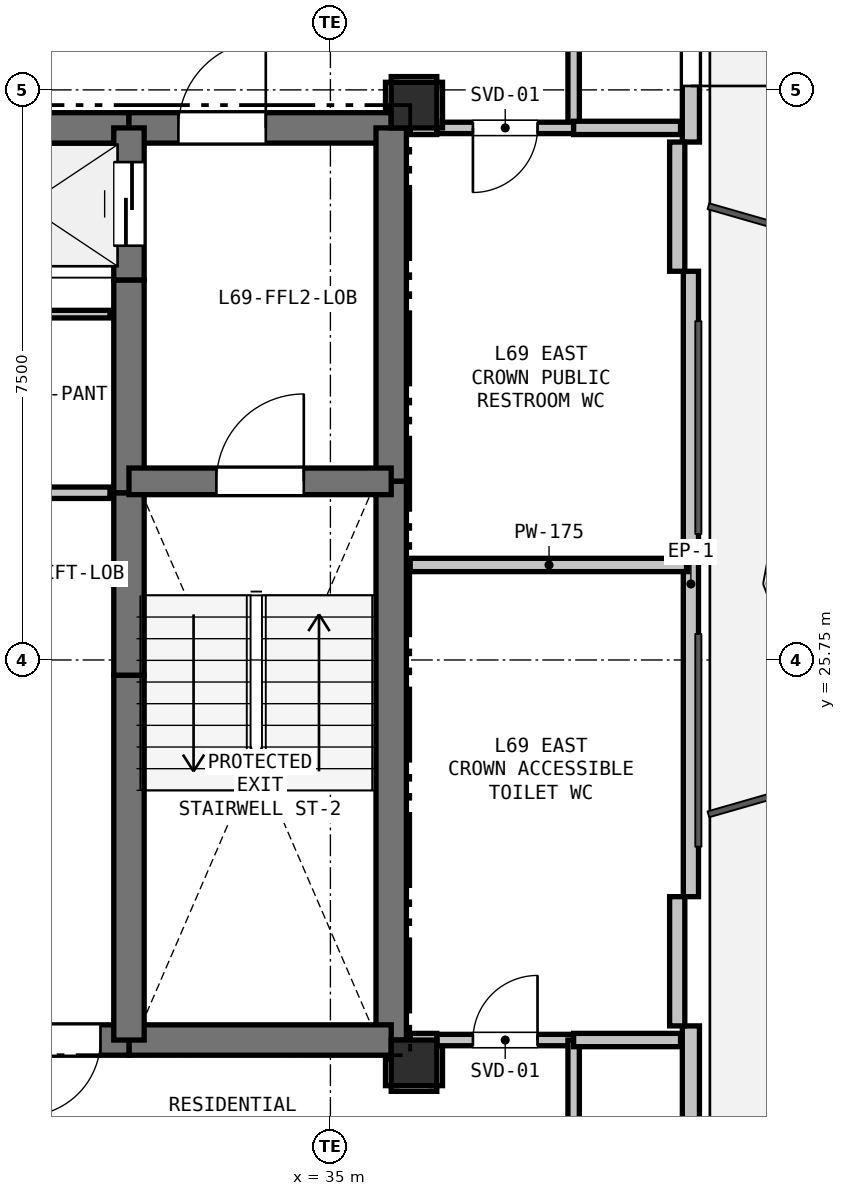
"""IFC4 building model, lengths in metres.
Left out: names, types, materials, properties, quantities, classifications, styles, units other than length and angle.
Written with IfcOpenShell. Run it as: python <this file> out.ifc"""

import sys

from ifc_helpers import new_model, si_unit, direction, frame, frame_2d, origin, origin_2d, place, context, subcontext, project, spatial, rectangle, extrude, element, fill, save


model = new_model("IFC4")
c1 = context("Model", 3, precision=1e-05, world=origin(), true_north=direction((0.0, 1.0)))
c2 = subcontext(c1, "Body", "Model", "MODEL_VIEW")
j1 = project(units=[si_unit("LENGTHUNIT", "METRE"), si_unit("PLANEANGLEUNIT", "RADIAN")], contexts=[c1])
p1 = place(None, origin())
s1 = spatial("IfcSite", under=j1, at=p1, CompositionType="ELEMENT")
p2 = place(p1, origin())
s2 = spatial("IfcBuilding", under=s1, at=p2, CompositionType="ELEMENT")
p3 = place(p2, frame((0.0, 0.0, 246.3)))
s3 = spatial("IfcBuildingStorey", under=s2, at=p3, CompositionType="ELEMENT", Elevation=246.3)
for number, where, z_axis, x_axis in (
    (1, (36.1, 33.05, 0.0), (0.0, 0.0, 1.0), (1.0, 0.0, 0.0)),
    (2, (36.1, 20.45, 0.0), (0.0, 0.0, 1.0), (1.0, 0.0, 0.0)),
):
    element("IfcColumn", number, at=place(p3, frame(where, z_axis=z_axis, x_axis=x_axis)), inside=s3, PredefinedType="COLUMN", context=c2, shape_type="SweptSolid", body=[
        extrude(rectangle(XDim=0.6, YDim=0.6, at=origin_2d()), origin(), (0.0, 0.0, 1.0), 3.3),
    ])
p4 = place(p3, frame((39.743, 41.492, 0.0), z_axis=(0.0, 0.0, 1.0), x_axis=(0.0, -1.0, 0.0)))
e3 = element("IfcWall", 3, at=p4, inside=s3, PredefinedType="SOLIDWALL", context=c2, shape_type="SweptSolid", body=[
    extrude(rectangle(XDim=8.928, YDim=0.225, at=frame_2d((4.464, 0.0))), origin(), (0.0, 0.0, 1.0), 2.64),
])
p5 = place(p4, frame((7.09, 0.0, 0.0)))
e4 = element("IfcOpeningElement", 4, at=p5, cuts=e3, PredefinedType="OPENING", context=c2, shape_type="SweptSolid", body=[
    extrude(rectangle(XDim=1.1, YDim=2.1, at=frame_2d((0.55, 1.05))), frame((0.0, 0.123, 0.0), z_axis=(0.0, -1.0, 0.0), x_axis=(1.0, 0.0, 0.0)), (0.0, 0.0, 1.0), 0.245),
])
p6 = place(p4, frame((1.406, 0.0, 0.9)))
e5 = element("IfcOpeningElement", 5, at=p6, cuts=e3, PredefinedType="OPENING", context=c2, shape_type="SweptSolid", body=[
    extrude(rectangle(XDim=1.2, YDim=1.4, at=frame_2d((0.6, 0.7))), frame((0.0, 0.123, 0.0), z_axis=(0.0, -1.0, 0.0), x_axis=(1.0, 0.0, 0.0)), (0.0, 0.0, 1.0), 0.245),
])
p7 = place(p3, frame((39.743, 30.864, 0.0), z_axis=(0.0, 0.0, 1.0), x_axis=(0.0, -1.0, 0.0)))
e6 = element("IfcWall", 6, at=p7, inside=s3, PredefinedType="PARAPET", context=c2, shape_type="SweptSolid", body=[
    extrude(rectangle(XDim=8.228, YDim=0.2, at=frame_2d((4.114, 0.0))), origin(), (0.0, 0.0, 1.0), 0.2),
])
p8 = place(p3, frame((39.743, 20.936, 0.0), z_axis=(0.0, 0.0, 1.0), x_axis=(0.0, -1.0, 0.0)))
e7 = element("IfcWall", 7, at=p8, inside=s3, PredefinedType="SOLIDWALL", context=c2, shape_type="SweptSolid", body=[
    extrude(rectangle(XDim=8.928, YDim=0.225, at=frame_2d((4.464, 0.0))), origin(), (0.0, 0.0, 1.0), 2.64),
])
p9 = place(p8, frame((5.56, 0.0, 0.9)))
e8 = element("IfcOpeningElement", 8, at=p9, cuts=e7, PredefinedType="OPENING", context=c2, shape_type="SweptSolid", body=[
    extrude(rectangle(XDim=1.8, YDim=1.5, at=frame_2d((0.9, 0.75))), frame((0.0, 0.123, 0.0), z_axis=(0.0, -1.0, 0.0), x_axis=(1.0, 0.0, 0.0)), (0.0, 0.0, 1.0), 0.245),
])
for number, where, z_axis, x_axis in (
    (9, (39.563, 32.564, 0.0), (0.0, 0.0, 1.0), (0.0, -1.0, 0.0)),
    (10, (39.563, 22.636, 0.0), (0.0, 0.0, 1.0), (0.0, -1.0, 0.0)),
):
    element("IfcWall", number, at=place(p3, frame(where, z_axis=z_axis, x_axis=x_axis)), inside=s3, PredefinedType="PARAPET", context=c2, shape_type="SweptSolid", body=[
        extrude(rectangle(XDim=1.7, YDim=0.2, at=frame_2d((0.85, 0.0))), origin(), (0.0, 0.0, 1.0), 2.64),
    ])
p10 = place(p3, frame((29.65, 32.75, 0.0), z_axis=(0.0, 0.0, 1.0), x_axis=(1.0, 0.0, 0.0)))
e11 = element("IfcWall", 11, at=p10, inside=s3, PredefinedType="SHEAR", context=c2, shape_type="SweptSolid", body=[
    extrude(rectangle(XDim=2.7, YDim=0.4, at=frame_2d((1.35, 0.0))), origin(), (0.0, 0.0, 1.0), 3.02),
])
p11 = place(p3, frame((32.35, 32.75, 0.0), z_axis=(0.0, 0.0, 1.0), x_axis=(1.0, 0.0, 0.0)))
e12 = element("IfcWall", 12, at=p11, inside=s3, PredefinedType="SHEAR", context=c2, shape_type="SweptSolid", body=[
    extrude(rectangle(XDim=3.45, YDim=0.4, at=frame_2d((1.725, 0.0))), origin(), (0.0, 0.0, 1.0), 3.02),
])
p12 = place(p11, frame((0.65, 0.0, 0.0)))
e13 = element("IfcOpeningElement", 13, at=p12, cuts=e12, PredefinedType="OPENING", context=c2, shape_type="SweptSolid", body=[
    extrude(rectangle(XDim=1.15, YDim=2.15, at=frame_2d((0.575, 1.075))), frame((0.0, 0.21, 0.0), z_axis=(0.0, -1.0, 0.0), x_axis=(1.0, 0.0, 0.0)), (0.0, 0.0, 1.0), 0.42),
])
p13 = place(p3, frame((35.8, 32.75, 0.0), z_axis=(0.0, 0.0, 1.0), x_axis=(0.0, -1.0, 0.0)))
e14 = element("IfcWall", 14, at=p13, inside=s3, PredefinedType="SHEAR", context=c2, shape_type="SweptSolid", body=[
    extrude(rectangle(XDim=4.65, YDim=0.4, at=frame_2d((2.325, 0.0))), origin(), (0.0, 0.0, 1.0), 3.02),
])
p14 = place(p3, frame((35.8, 28.1, 0.0), z_axis=(0.0, 0.0, 1.0), x_axis=(0.0, -1.0, 0.0)))
e15 = element("IfcWall", 15, at=p14, inside=s3, PredefinedType="SHEAR", context=c2, shape_type="SweptSolid", body=[
    extrude(rectangle(XDim=7.35, YDim=0.4, at=frame_2d((3.675, 0.0))), origin(), (0.0, 0.0, 1.0), 3.02),
])
p15 = place(p3, frame((35.8, 20.75, 0.0), z_axis=(0.0, 0.0, 1.0), x_axis=(-1.0, 0.0, 0.0)))
e16 = element("IfcWall", 16, at=p15, inside=s3, PredefinedType="SHEAR", context=c2, shape_type="SweptSolid", body=[
    extrude(rectangle(XDim=3.45, YDim=0.4, at=frame_2d((1.725, 0.0))), origin(), (0.0, 0.0, 1.0), 3.02),
])
p16 = place(p3, frame((32.35, 20.75, 0.0), z_axis=(0.0, 0.0, 1.0), x_axis=(-1.0, 0.0, 0.0)))
e17 = element("IfcWall", 17, at=p16, inside=s3, PredefinedType="SHEAR", context=c2, shape_type="SweptSolid", body=[
    extrude(rectangle(XDim=1.75, YDim=0.4, at=frame_2d((0.875, 0.0))), origin(), (0.0, 0.0, 1.0), 3.02),
])
p17 = place(p16, frame((0.375, 0.0, 0.0)))
e18 = element("IfcOpeningElement", 18, at=p17, cuts=e17, PredefinedType="OPENING", context=c2, shape_type="SweptSolid", body=[
    extrude(rectangle(XDim=1.0, YDim=2.15, at=frame_2d((0.5, 1.075))), frame((0.0, 0.21, 0.0), z_axis=(0.0, -1.0, 0.0), x_axis=(1.0, 0.0, 0.0)), (0.0, 0.0, 1.0), 0.42),
])
p18 = place(p3, frame((32.35, 20.75, 0.0), z_axis=(0.0, 0.0, 1.0), x_axis=(0.0, 1.0, 0.0)))
e19 = element("IfcWall", 19, at=p18, inside=s3, PredefinedType="SHEAR", context=c2, shape_type="SweptSolid", body=[
    extrude(rectangle(XDim=4.8, YDim=0.4, at=frame_2d((2.4, 0.0))), origin(), (0.0, 0.0, 1.0), 3.02),
])
p19 = place(p3, frame((32.35, 25.55, 0.0), z_axis=(0.0, 0.0, 1.0), x_axis=(0.0, 1.0, 0.0)))
e20 = element("IfcWall", 20, at=p19, inside=s3, PredefinedType="SHEAR", context=c2, shape_type="SweptSolid", body=[
    extrude(rectangle(XDim=2.4, YDim=0.4, at=frame_2d((1.2, 0.0))), origin(), (0.0, 0.0, 1.0), 3.02),
])
p20 = place(p3, frame((32.35, 27.95, 0.0), z_axis=(0.0, 0.0, 1.0), x_axis=(0.0, 1.0, 0.0)))
e21 = element("IfcWall", 21, at=p20, inside=s3, PredefinedType="SHEAR", context=c2, shape_type="SweptSolid", body=[
    extrude(rectangle(XDim=2.8, YDim=0.4, at=frame_2d((1.4, 0.0))), origin(), (0.0, 0.0, 1.0), 3.02),
])
p21 = place(p3, frame((32.35, 30.75, 0.0), z_axis=(0.0, 0.0, 1.0), x_axis=(0.0, 1.0, 0.0)))
e22 = element("IfcWall", 22, at=p21, inside=s3, PredefinedType="SHEAR", context=c2, shape_type="SweptSolid", body=[
    extrude(rectangle(XDim=2.0, YDim=0.4, at=frame_2d((1.0, 0.0))), origin(), (0.0, 0.0, 1.0), 3.02),
])
p22 = place(p21, frame((0.45, 0.0, 0.0)))
e23 = element("IfcOpeningElement", 23, at=p22, cuts=e22, PredefinedType="OPENING", context=c2, shape_type="SweptSolid", body=[
    extrude(rectangle(XDim=1.1, YDim=2.15, at=frame_2d((0.55, 1.075))), frame((0.0, 0.21, 0.0), z_axis=(0.0, -1.0, 0.0), x_axis=(1.0, 0.0, 0.0)), (0.0, 0.0, 1.0), 0.42),
])
p23 = place(p3, frame((32.35, 28.1, 0.0), z_axis=(0.0, 0.0, 1.0), x_axis=(1.0, 0.0, 0.0)))
e24 = element("IfcWall", 24, at=p23, inside=s3, PredefinedType="SHEAR", context=c2, shape_type="SweptSolid", body=[
    extrude(rectangle(XDim=3.45, YDim=0.35, at=frame_2d((1.725, 0.0))), origin(), (0.0, 0.0, 1.0), 3.02),
])
p24 = place(p23, frame((1.15, 0.0, 0.0)))
e25 = element("IfcOpeningElement", 25, at=p24, cuts=e24, PredefinedType="OPENING", context=c2, shape_type="SweptSolid", body=[
    extrude(rectangle(XDim=1.15, YDim=2.15, at=frame_2d((0.575, 1.075))), frame((0.0, 0.185, 0.0), z_axis=(0.0, -1.0, 0.0), x_axis=(1.0, 0.0, 0.0)), (0.0, 0.0, 1.0), 0.37),
])
p25 = place(p3, frame((32.1, 30.3, 0.0), z_axis=(0.0, 0.0, 1.0), x_axis=(-1.0, 0.0, 0.0)))
e26 = element("IfcWall", 26, at=p25, inside=s3, PredefinedType="PARTITIONING", context=c2, shape_type="SweptSolid", body=[
    extrude(rectangle(XDim=2.45, YDim=0.1, at=frame_2d((1.225, 0.0))), origin(), (0.0, 0.0, 1.0), 3.02),
])
p26 = place(p3, frame((27.4, 27.95, 0.0), z_axis=(0.0, 0.0, 1.0), x_axis=(1.0, 0.0, 0.0)))
e27 = element("IfcWall", 27, at=p26, inside=s3, PredefinedType="PARTITIONING", context=c2, shape_type="SweptSolid", body=[
    extrude(rectangle(XDim=4.7, YDim=0.15, at=frame_2d((2.35, 0.0))), origin(), (0.0, 0.0, 1.0), 3.02),
])
p27 = place(p26, frame((1.85, 0.0, 0.0)))
e28 = element("IfcOpeningElement", 28, at=p27, cuts=e27, PredefinedType="OPENING", context=c2, shape_type="SweptSolid", body=[
    extrude(rectangle(XDim=1.0, YDim=2.15, at=frame_2d((0.5, 1.075))), frame((0.0, 0.085, 0.0), z_axis=(0.0, -1.0, 0.0), x_axis=(1.0, 0.0, 0.0)), (0.0, 0.0, 1.0), 0.17),
])
p28 = place(p3, frame((38.2, 35.2, 0.0), z_axis=(0.0, 0.0, 1.0), x_axis=(0.0, -1.0, 0.0)))
e29 = element("IfcWall", 29, at=p28, inside=s3, PredefinedType="PARTITIONING", context=c2, shape_type="SweptSolid", body=[
    extrude(rectangle(XDim=2.45, YDim=0.15, at=frame_2d((1.225, 0.0))), origin(), (0.0, 0.0, 1.0), 3.02),
])
p29 = place(p3, frame((38.2, 32.75, 0.0), z_axis=(0.0, 0.0, 1.0), x_axis=(-1.0, 0.0, 0.0)))
e30 = element("IfcWall", 30, at=p29, inside=s3, PredefinedType="PARTITIONING", context=c2, shape_type="SweptSolid", body=[
    extrude(rectangle(XDim=1.8, YDim=0.15, at=frame_2d((0.9, 0.0))), origin(), (0.0, 0.0, 1.0), 3.02),
])
p30 = place(p29, frame((0.475, 0.0, 0.0)))
e31 = element("IfcOpeningElement", 31, at=p30, cuts=e30, PredefinedType="OPENING", context=c2, shape_type="SweptSolid", body=[
    extrude(rectangle(XDim=0.85, YDim=2.1, at=frame_2d((0.425, 1.05))), frame((0.0, 0.085, 0.0), z_axis=(0.0, -1.0, 0.0), x_axis=(1.0, 0.0, 0.0)), (0.0, 0.0, 1.0), 0.17),
])
p31 = place(p3, frame((36.4, 32.75, 0.0), z_axis=(0.0, 0.0, 1.0), x_axis=(0.0, 1.0, 0.0)))
e32 = element("IfcWall", 32, at=p31, inside=s3, PredefinedType="PARTITIONING", context=c2, shape_type="SweptSolid", body=[
    extrude(rectangle(XDim=0.6, YDim=0.15, at=frame_2d((0.3, 0.0))), origin(), (0.0, 0.0, 1.0), 2.468),
])
p32 = place(p3, frame((36.4, 33.35, 0.0), z_axis=(0.0, 0.0, 1.0), x_axis=(-1.0, 0.0, 0.0)))
e33 = element("IfcWall", 33, at=p32, inside=s3, PredefinedType="PARTITIONING", context=c2, shape_type="SweptSolid", body=[
    extrude(rectangle(XDim=0.6, YDim=0.15, at=frame_2d((0.3, 0.0))), origin(), (0.0, 0.0, 1.0), 2.468),
])
p33 = place(p3, frame((35.8, 33.35, 0.0), z_axis=(0.0, 0.0, 1.0), x_axis=(0.0, -1.0, 0.0)))
e34 = element("IfcWall", 34, at=p33, inside=s3, PredefinedType="PARTITIONING", context=c2, shape_type="SweptSolid", body=[
    extrude(rectangle(XDim=0.35, YDim=0.15, at=frame_2d((0.175, 0.0))), origin(), (0.0, 0.0, 1.0), 2.545),
])
p34 = place(p3, frame((35.8, 20.15, 0.0), z_axis=(0.0, 0.0, 1.0), x_axis=(1.0, 0.0, 0.0)))
e35 = element("IfcWall", 35, at=p34, inside=s3, PredefinedType="PARTITIONING", context=c2, shape_type="SweptSolid", body=[
    extrude(rectangle(XDim=0.6, YDim=0.15, at=frame_2d((0.3, 0.0))), origin(), (0.0, 0.0, 1.0), 2.468),
])
p35 = place(p3, frame((36.4, 20.15, 0.0), z_axis=(0.0, 0.0, 1.0), x_axis=(0.0, 1.0, 0.0)))
e36 = element("IfcWall", 36, at=p35, inside=s3, PredefinedType="PARTITIONING", context=c2, shape_type="SweptSolid", body=[
    extrude(rectangle(XDim=0.6, YDim=0.15, at=frame_2d((0.3, 0.0))), origin(), (0.0, 0.0, 1.0), 3.02),
])
p36 = place(p3, frame((36.4, 20.75, 0.0), z_axis=(0.0, 0.0, 1.0), x_axis=(1.0, 0.0, 0.0)))
e37 = element("IfcWall", 37, at=p36, inside=s3, PredefinedType="PARTITIONING", context=c2, shape_type="SweptSolid", body=[
    extrude(rectangle(XDim=1.8, YDim=0.15, at=frame_2d((0.9, 0.0))), origin(), (0.0, 0.0, 1.0), 3.02),
])
p37 = place(p36, frame((0.475, 0.0, 0.0)))
e38 = element("IfcOpeningElement", 38, at=p37, cuts=e37, PredefinedType="OPENING", context=c2, shape_type="SweptSolid", body=[
    extrude(rectangle(XDim=0.85, YDim=2.1, at=frame_2d((0.425, 1.05))), frame((0.0, 0.085, 0.0), z_axis=(0.0, -1.0, 0.0), x_axis=(1.0, 0.0, 0.0)), (0.0, 0.0, 1.0), 0.17),
])
p38 = place(p3, frame((38.2, 20.75, 0.0), z_axis=(0.0, 0.0, 1.0), x_axis=(0.0, -1.0, 0.0)))
e39 = element("IfcWall", 39, at=p38, inside=s3, PredefinedType="PARTITIONING", context=c2, shape_type="SweptSolid", body=[
    extrude(rectangle(XDim=2.45, YDim=0.15, at=frame_2d((1.225, 0.0))), origin(), (0.0, 0.0, 1.0), 3.02),
])
p39 = place(p3, frame((35.8, 20.5, 0.0), z_axis=(0.0, 0.0, 1.0), x_axis=(0.0, -1.0, 0.0)))
e40 = element("IfcWall", 40, at=p39, inside=s3, PredefinedType="PARTITIONING", context=c2, shape_type="SweptSolid", body=[
    extrude(rectangle(XDim=0.35, YDim=0.15, at=frame_2d((0.175, 0.0))), origin(), (0.0, 0.0, 1.0), 2.545),
])
p40 = place(p3, frame((36.05, 32.75, 0.0), z_axis=(0.0, 0.0, 1.0), x_axis=(1.0, 0.0, 0.0)))
e41 = element("IfcWall", 41, at=p40, inside=s3, PredefinedType="PLUMBINGWALL", context=c2, shape_type="SweptSolid", body=[
    extrude(rectangle(XDim=0.35, YDim=0.175, at=frame_2d((0.175, 0.0))), origin(), (0.0, 0.0, 1.0), 2.545),
])
p41 = place(p3, frame((38.2, 32.75, 0.0), z_axis=(0.0, 0.0, 1.0), x_axis=(1.0, 0.0, 0.0)))
e42 = element("IfcWall", 42, at=p41, inside=s3, PredefinedType="PLUMBINGWALL", context=c2, shape_type="SweptSolid", body=[
    extrude(rectangle(XDim=1.406, YDim=0.175, at=frame_2d((0.703, 0.0))), origin(), (0.0, 0.0, 1.0), 2.365),
])
p42 = place(p3, frame((39.703, 27.0, 0.0), z_axis=(0.0, 0.0, 1.0), x_axis=(-1.0, 0.0, 0.0)))
e43 = element("IfcWall", 43, at=p42, inside=s3, PredefinedType="PLUMBINGWALL", context=c2, shape_type="SweptSolid", body=[
    extrude(rectangle(XDim=3.653, YDim=0.175, at=frame_2d((1.826, 0.0))), origin(), (0.0, 0.0, 1.0), 2.365),
])
p43 = place(p3, frame((39.606, 20.75, 0.0), z_axis=(0.0, 0.0, 1.0), x_axis=(-1.0, 0.0, 0.0)))
e44 = element("IfcWall", 44, at=p43, inside=s3, PredefinedType="PLUMBINGWALL", context=c2, shape_type="SweptSolid", body=[
    extrude(rectangle(XDim=1.406, YDim=0.175, at=frame_2d((0.703, 0.0))), origin(), (0.0, 0.0, 1.0), 2.365),
])
p44 = place(p3, frame((36.4, 20.75, 0.0), z_axis=(0.0, 0.0, 1.0), x_axis=(-1.0, 0.0, 0.0)))
e45 = element("IfcWall", 45, at=p44, inside=s3, PredefinedType="PLUMBINGWALL", context=c2, shape_type="SweptSolid", body=[
    extrude(rectangle(XDim=0.35, YDim=0.175, at=frame_2d((0.175, 0.0))), origin(), (0.0, 0.0, 1.0), 2.545),
])
p45 = place(p5, origin())
e46 = element("IfcDoor", 46, at=p45, inside=s3, OperationType="SINGLE_SWING_RIGHT", PredefinedType="DOOR", context=c2, shape_type="SweptSolid", body=[
    extrude(rectangle(XDim=1.1, YDim=2.1, at=frame_2d((0.55, 1.05))), frame((0.0, 0.025, 0.0), z_axis=(0.0, -1.0, 0.0), x_axis=(1.0, 0.0, 0.0)), (0.0, 0.0, 1.0), 0.05),
])
fill(e4, e46)
p46 = place(p17, origin())
e47 = element("IfcDoor", 47, at=p46, inside=s3, OperationType="SINGLE_SWING_RIGHT", PredefinedType="DOOR", context=c2, shape_type="SweptSolid", body=[
    extrude(rectangle(XDim=1.0, YDim=2.15, at=frame_2d((0.5, 1.075))), frame((0.0, 0.025, 0.0), z_axis=(0.0, -1.0, 0.0), x_axis=(1.0, 0.0, 0.0)), (0.0, 0.0, 1.0), 0.05),
])
fill(e18, e47)
p47 = place(p22, origin())
e48 = element("IfcDoor", 48, at=p47, inside=s3, OperationType="SLIDING_TO_LEFT", PredefinedType="DOOR", context=c2, shape_type="SweptSolid", body=[
    extrude(rectangle(XDim=1.1, YDim=2.15, at=frame_2d((0.55, 1.075))), frame((0.0, 0.025, 0.0), z_axis=(0.0, -1.0, 0.0), x_axis=(1.0, 0.0, 0.0)), (0.0, 0.0, 1.0), 0.05),
])
fill(e23, e48)
p48 = place(p24, origin())
e49 = element("IfcDoor", 49, at=p48, inside=s3, OperationType="SINGLE_SWING_RIGHT", PredefinedType="DOOR", context=c2, shape_type="SweptSolid", body=[
    extrude(rectangle(XDim=1.15, YDim=2.15, at=frame_2d((0.575, 1.075))), frame((0.0, 0.025, 0.0), z_axis=(0.0, -1.0, 0.0), x_axis=(1.0, 0.0, 0.0)), (0.0, 0.0, 1.0), 0.05),
])
fill(e25, e49)
p49 = place(p12, origin())
e50 = element("IfcDoor", 50, at=p49, inside=s3, OperationType="SINGLE_SWING_RIGHT", PredefinedType="DOOR", context=c2, shape_type="SweptSolid", body=[
    extrude(rectangle(XDim=1.15, YDim=2.15, at=frame_2d((0.575, 1.075))), frame((0.0, 0.025, 0.0), z_axis=(0.0, -1.0, 0.0), x_axis=(1.0, 0.0, 0.0)), (0.0, 0.0, 1.0), 0.05),
])
fill(e13, e50)
p50 = place(p30, origin())
e51 = element("IfcDoor", 51, at=p50, inside=s3, OperationType="SINGLE_SWING_RIGHT", PredefinedType="DOOR", context=c2, shape_type="SweptSolid", body=[
    extrude(rectangle(XDim=0.85, YDim=2.1, at=frame_2d((0.425, 1.05))), frame((0.0, 0.025, 0.0), z_axis=(0.0, -1.0, 0.0), x_axis=(1.0, 0.0, 0.0)), (0.0, 0.0, 1.0), 0.05),
])
fill(e31, e51)
p51 = place(p37, origin())
e52 = element("IfcDoor", 52, at=p51, inside=s3, OperationType="SINGLE_SWING_RIGHT", PredefinedType="DOOR", context=c2, shape_type="SweptSolid", body=[
    extrude(rectangle(XDim=0.85, YDim=2.1, at=frame_2d((0.425, 1.05))), frame((0.0, 0.025, 0.0), z_axis=(0.0, -1.0, 0.0), x_axis=(1.0, 0.0, 0.0)), (0.0, 0.0, 1.0), 0.05),
])
fill(e38, e52)
save(model, sys.argv[1])
